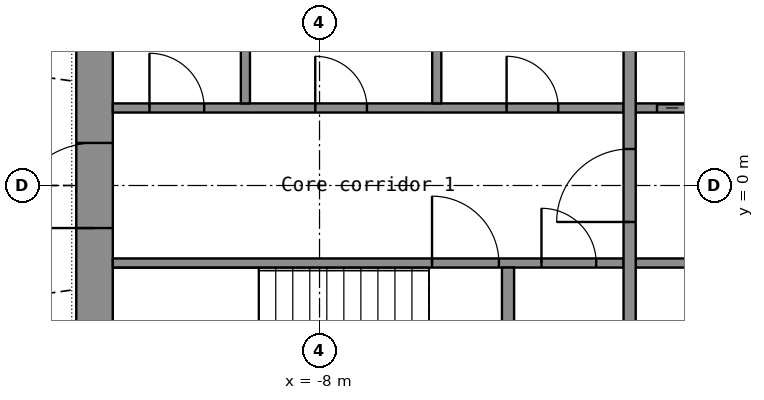
"""IFC4 building model, lengths in metres.
Left out: names, types, materials, properties, quantities, classifications, styles, units other than length and angle.
Written with IfcOpenShell. Run it as: python <this file> out.ifc"""

import sys

from ifc_helpers import new_model, si_unit, direction, frame, frame_2d, origin, place, context, subcontext, project, spatial, rectangle, extrude, element, fill, save


model = new_model("IFC4")
c1 = context("Model", 3, precision=1e-05, world=origin(), true_north=direction((0.0, 1.0)))
c2 = subcontext(c1, "Body", "Model", "MODEL_VIEW")
j1 = project(units=[si_unit("LENGTHUNIT", "METRE"), si_unit("PLANEANGLEUNIT", "RADIAN")], contexts=[c1])
p1 = place(None, origin())
s1 = spatial("IfcSite", under=j1, at=p1, CompositionType="ELEMENT")
p2 = place(p1, origin())
s2 = spatial("IfcBuilding", under=s1, at=p2, CompositionType="ELEMENT")
p3 = place(p2, frame((0.0, 0.0, 44.5)))
s3 = spatial("IfcBuildingStorey", under=s2, at=p3, CompositionType="ELEMENT", Elevation=44.5)
p4 = place(p3, frame((-11.7, -7.2, 0.0), z_axis=(0.0, 0.0, 1.0), x_axis=(0.0, 1.0, 0.0)))
e1 = element("IfcWall", 1, at=p4, inside=s3, PredefinedType="SHEAR", context=c2, shape_type="SweptSolid", body=[
    extrude(rectangle(XDim=14.4, YDim=0.6, at=frame_2d((7.2, 0.0))), origin(), (0.0, 0.0, 1.0), 3.3),
])
p5 = place(p4, frame((6.5, 0.0, 0.0)))
e2 = element("IfcOpeningElement", 2, at=p5, cuts=e1, PredefinedType="OPENING", context=c2, shape_type="SweptSolid", body=[
    extrude(rectangle(XDim=1.4, YDim=2.2, at=frame_2d((0.7, 1.1))), frame((0.0, 0.31, 0.0), z_axis=(0.0, -1.0, 0.0), x_axis=(1.0, 0.0, 0.0)), (0.0, 0.0, 1.0), 0.62),
])
p6 = place(p3, frame((-11.4, -1.275, 0.0), z_axis=(0.0, 0.0, 1.0), x_axis=(1.0, 0.0, 0.0)))
e3 = element("IfcWall", 3, at=p6, inside=s3, PredefinedType="SHEAR", context=c2, shape_type="SweptSolid", body=[
    extrude(rectangle(XDim=8.4, YDim=0.15, at=frame_2d((4.2, 0.0))), origin(), (0.0, 0.0, 1.0), 3.3),
])
p7 = place(p6, frame((5.25, 0.0, 0.0)))
e4 = element("IfcOpeningElement", 4, at=p7, cuts=e3, PredefinedType="OPENING", context=c2, shape_type="SweptSolid", body=[
    extrude(rectangle(XDim=1.1, YDim=2.15, at=frame_2d((0.55, 1.075))), frame((0.0, 0.085, 0.0), z_axis=(0.0, -1.0, 0.0), x_axis=(1.0, 0.0, 0.0)), (0.0, 0.0, 1.0), 0.17),
])
p8 = place(p6, frame((7.05, 0.0, 0.0)))
e5 = element("IfcOpeningElement", 5, at=p8, cuts=e3, PredefinedType="OPENING", context=c2, shape_type="SweptSolid", body=[
    extrude(rectangle(XDim=0.9, YDim=2.1, at=frame_2d((0.45, 1.05))), frame((0.0, 0.085, 0.0), z_axis=(0.0, -1.0, 0.0), x_axis=(1.0, 0.0, 0.0)), (0.0, 0.0, 1.0), 0.17),
])
p9 = place(p3, frame((-2.8, -1.275, 0.0), z_axis=(0.0, 0.0, 1.0), x_axis=(1.0, 0.0, 0.0)))
e6 = element("IfcWall", 6, at=p9, inside=s3, PredefinedType="SHEAR", context=c2, shape_type="SweptSolid", body=[
    extrude(rectangle(XDim=5.6, YDim=0.15, at=frame_2d((2.8, 0.0))), origin(), (0.0, 0.0, 1.0), 3.3),
])
p10 = place(p9, frame((4.15, 0.0, 0.0)))
e7 = element("IfcOpeningElement", 7, at=p10, cuts=e6, PredefinedType="OPENING", context=c2, shape_type="SweptSolid", body=[
    extrude(rectangle(XDim=1.1, YDim=2.2, at=frame_2d((0.55, 1.1))), frame((0.0, 0.085, 0.0), z_axis=(0.0, -1.0, 0.0), x_axis=(1.0, 0.0, 0.0)), (0.0, 0.0, 1.0), 0.17),
])
p11 = place(p9, frame((1.35, 0.0, 0.0)))
e8 = element("IfcOpeningElement", 8, at=p11, cuts=e6, PredefinedType="OPENING", context=c2, shape_type="SweptSolid", body=[
    extrude(rectangle(XDim=0.9, YDim=2.1, at=frame_2d((0.45, 1.05))), frame((0.0, 0.085, 0.0), z_axis=(0.0, -1.0, 0.0), x_axis=(1.0, 0.0, 0.0)), (0.0, 0.0, 1.0), 0.17),
])
p12 = place(p3, frame((-11.4, 1.275, 0.0), z_axis=(0.0, 0.0, 1.0), x_axis=(1.0, 0.0, 0.0)))
e9 = element("IfcWall", 9, at=p12, inside=s3, PredefinedType="PARTITIONING", context=c2, shape_type="SweptSolid", body=[
    extrude(rectangle(XDim=8.4, YDim=0.15, at=frame_2d((4.2, 0.0))), origin(), (0.0, 0.0, 1.0), 3.3),
])
p13 = place(p12, frame((0.603, 0.0, 0.0)))
e10 = element("IfcOpeningElement", 10, at=p13, cuts=e9, PredefinedType="OPENING", context=c2, shape_type="SweptSolid", body=[
    extrude(rectangle(XDim=0.9, YDim=2.1, at=frame_2d((0.45, 1.05))), frame((0.0, 0.085, 0.0), z_axis=(0.0, -1.0, 0.0), x_axis=(1.0, 0.0, 0.0)), (0.0, 0.0, 1.0), 0.17),
])
p14 = place(p12, frame((3.33, 0.0, 0.0)))
e11 = element("IfcOpeningElement", 11, at=p14, cuts=e9, PredefinedType="OPENING", context=c2, shape_type="SweptSolid", body=[
    extrude(rectangle(XDim=0.85, YDim=2.1, at=frame_2d((0.425, 1.05))), frame((0.0, 0.085, 0.0), z_axis=(0.0, -1.0, 0.0), x_axis=(1.0, 0.0, 0.0)), (0.0, 0.0, 1.0), 0.17),
])
p15 = place(p12, frame((6.477, 0.0, 0.0)))
e12 = element("IfcOpeningElement", 12, at=p15, cuts=e9, PredefinedType="OPENING", context=c2, shape_type="SweptSolid", body=[
    extrude(rectangle(XDim=0.85, YDim=2.1, at=frame_2d((0.425, 1.05))), frame((0.0, 0.085, 0.0), z_axis=(0.0, -1.0, 0.0), x_axis=(1.0, 0.0, 0.0)), (0.0, 0.0, 1.0), 0.17),
])
p16 = place(p3, frame((-2.8, 1.275, 0.0), z_axis=(0.0, 0.0, 1.0), x_axis=(1.0, 0.0, 0.0)))
e13 = element("IfcWall", 13, at=p16, inside=s3, PredefinedType="SHEAR", context=c2, shape_type="SweptSolid", body=[
    extrude(rectangle(XDim=5.6, YDim=0.15, at=frame_2d((2.8, 0.0))), origin(), (0.0, 0.0, 1.0), 3.3),
])
p17 = place(p16, frame((0.35, 0.0, 0.0)))
e14 = element("IfcOpeningElement", 14, at=p17, cuts=e13, PredefinedType="OPENING", context=c2, shape_type="SweptSolid", body=[
    extrude(rectangle(XDim=1.1, YDim=2.2, at=frame_2d((0.55, 1.1))), frame((0.0, 0.085, 0.0), z_axis=(0.0, -1.0, 0.0), x_axis=(1.0, 0.0, 0.0)), (0.0, 0.0, 1.0), 0.17),
])
p18 = place(p16, frame((3.35, 0.0, 0.0)))
e15 = element("IfcOpeningElement", 15, at=p18, cuts=e13, PredefinedType="OPENING", context=c2, shape_type="SweptSolid", body=[
    extrude(rectangle(XDim=0.9, YDim=2.1, at=frame_2d((0.45, 1.05))), frame((0.0, 0.085, 0.0), z_axis=(0.0, -1.0, 0.0), x_axis=(1.0, 0.0, 0.0)), (0.0, 0.0, 1.0), 0.17),
])
p19 = place(p3, frame((-2.9, -3.7, 0.0), z_axis=(0.0, 0.0, 1.0), x_axis=(0.0, 1.0, 0.0)))
e16 = element("IfcWall", 16, at=p19, inside=s3, PredefinedType="SHEAR", context=c2, shape_type="SweptSolid", body=[
    extrude(rectangle(XDim=7.4, YDim=0.2, at=frame_2d((3.7, 0.0))), origin(), (0.0, 0.0, 1.0), 3.3),
])
p20 = place(p19, frame((3.1, 0.0, 0.0)))
e17 = element("IfcOpeningElement", 17, at=p20, cuts=e16, PredefinedType="OPENING", context=c2, shape_type="SweptSolid", body=[
    extrude(rectangle(XDim=1.2, YDim=2.2, at=frame_2d((0.6, 1.1))), frame((0.0, 0.11, 0.0), z_axis=(0.0, -1.0, 0.0), x_axis=(1.0, 0.0, 0.0)), (0.0, 0.0, 1.0), 0.22),
])
p21 = place(p3, frame((-4.9, -3.7, 0.0), z_axis=(0.0, 0.0, 1.0), x_axis=(0.0, 1.0, 0.0)))
e18 = element("IfcWall", 18, at=p21, inside=s3, PredefinedType="SHEAR", context=c2, shape_type="SweptSolid", body=[
    extrude(rectangle(XDim=2.35, YDim=0.2, at=frame_2d((1.175, 0.0))), origin(), (0.0, 0.0, 1.0), 3.3),
])
for number, where, z_axis, x_axis in (
    (19, (-9.219, 1.35, 0.0), (0.0, 0.0, 1.0), (0.0, 1.0, 0.0)),
    (20, (-6.072, 1.35, 0.0), (0.0, 0.0, 1.0), (0.0, 1.0, 0.0)),
):
    element("IfcWall", number, at=place(p3, frame(where, z_axis=z_axis, x_axis=x_axis)), inside=s3, PredefinedType="PARTITIONING", context=c2, shape_type="SweptSolid", body=[
        extrude(rectangle(XDim=2.35, YDim=0.15, at=frame_2d((1.175, 0.0))), origin(), (0.0, 0.0, 1.0), 3.3),
    ])
p22 = place(p5, origin())
e21 = element("IfcDoor", 21, at=p22, inside=s3, OperationType="DOUBLE_DOOR_SINGLE_SWING", PredefinedType="DOOR", context=c2, shape_type="SweptSolid", body=[
    extrude(rectangle(XDim=1.4, YDim=2.2, at=frame_2d((0.7, 1.1))), frame((0.0, 0.025, 0.0), z_axis=(0.0, -1.0, 0.0), x_axis=(1.0, 0.0, 0.0)), (0.0, 0.0, 1.0), 0.05),
])
fill(e2, e21)
p23 = place(p20, origin())
e22 = element("IfcDoor", 22, at=p23, inside=s3, OperationType="SINGLE_SWING_LEFT", PredefinedType="DOOR", context=c2, shape_type="SweptSolid", body=[
    extrude(rectangle(XDim=1.2, YDim=2.2, at=frame_2d((0.6, 1.1))), frame((0.0, 0.025, 0.0), z_axis=(0.0, -1.0, 0.0), x_axis=(1.0, 0.0, 0.0)), (0.0, 0.0, 1.0), 0.05),
])
fill(e17, e22)
p24 = place(p17, origin())
e23 = element("IfcDoor", 23, at=p24, inside=s3, OperationType="DOUBLE_DOOR_SLIDING", PredefinedType="DOOR", context=c2, shape_type="SweptSolid", body=[
    extrude(rectangle(XDim=1.1, YDim=2.2, at=frame_2d((0.55, 1.1))), frame((0.0, 0.025, 0.0), z_axis=(0.0, -1.0, 0.0), x_axis=(1.0, 0.0, 0.0)), (0.0, 0.0, 1.0), 0.05),
])
fill(e14, e23)
p25 = place(p7, origin())
e24 = element("IfcDoor", 24, at=p25, inside=s3, OperationType="SINGLE_SWING_LEFT", PredefinedType="DOOR", context=c2, shape_type="SweptSolid", body=[
    extrude(rectangle(XDim=1.1, YDim=2.15, at=frame_2d((0.55, 1.075))), frame((0.0, 0.025, 0.0), z_axis=(0.0, -1.0, 0.0), x_axis=(1.0, 0.0, 0.0)), (0.0, 0.0, 1.0), 0.05),
])
fill(e4, e24)
p26 = place(p13, origin())
e25 = element("IfcDoor", 25, at=p26, inside=s3, OperationType="SINGLE_SWING_LEFT", PredefinedType="DOOR", context=c2, shape_type="SweptSolid", body=[
    extrude(rectangle(XDim=0.9, YDim=2.1, at=frame_2d((0.45, 1.05))), frame((0.0, 0.025, 0.0), z_axis=(0.0, -1.0, 0.0), x_axis=(1.0, 0.0, 0.0)), (0.0, 0.0, 1.0), 0.05),
])
fill(e10, e25)
p27 = place(p14, origin())
e26 = element("IfcDoor", 26, at=p27, inside=s3, OperationType="SINGLE_SWING_LEFT", PredefinedType="DOOR", context=c2, shape_type="SweptSolid", body=[
    extrude(rectangle(XDim=0.85, YDim=2.1, at=frame_2d((0.425, 1.05))), frame((0.0, 0.025, 0.0), z_axis=(0.0, -1.0, 0.0), x_axis=(1.0, 0.0, 0.0)), (0.0, 0.0, 1.0), 0.05),
])
fill(e11, e26)
p28 = place(p15, origin())
e27 = element("IfcDoor", 27, at=p28, inside=s3, OperationType="SINGLE_SWING_LEFT", PredefinedType="DOOR", context=c2, shape_type="SweptSolid", body=[
    extrude(rectangle(XDim=0.85, YDim=2.1, at=frame_2d((0.425, 1.05))), frame((0.0, 0.025, 0.0), z_axis=(0.0, -1.0, 0.0), x_axis=(1.0, 0.0, 0.0)), (0.0, 0.0, 1.0), 0.05),
])
fill(e12, e27)
p29 = place(p8, origin())
e28 = element("IfcDoor", 28, at=p29, inside=s3, OperationType="SINGLE_SWING_LEFT", PredefinedType="DOOR", context=c2, shape_type="SweptSolid", body=[
    extrude(rectangle(XDim=0.9, YDim=2.1, at=frame_2d((0.45, 1.05))), frame((0.0, 0.025, 0.0), z_axis=(0.0, -1.0, 0.0), x_axis=(1.0, 0.0, 0.0)), (0.0, 0.0, 1.0), 0.05),
])
fill(e5, e28)
save(model, sys.argv[1])
